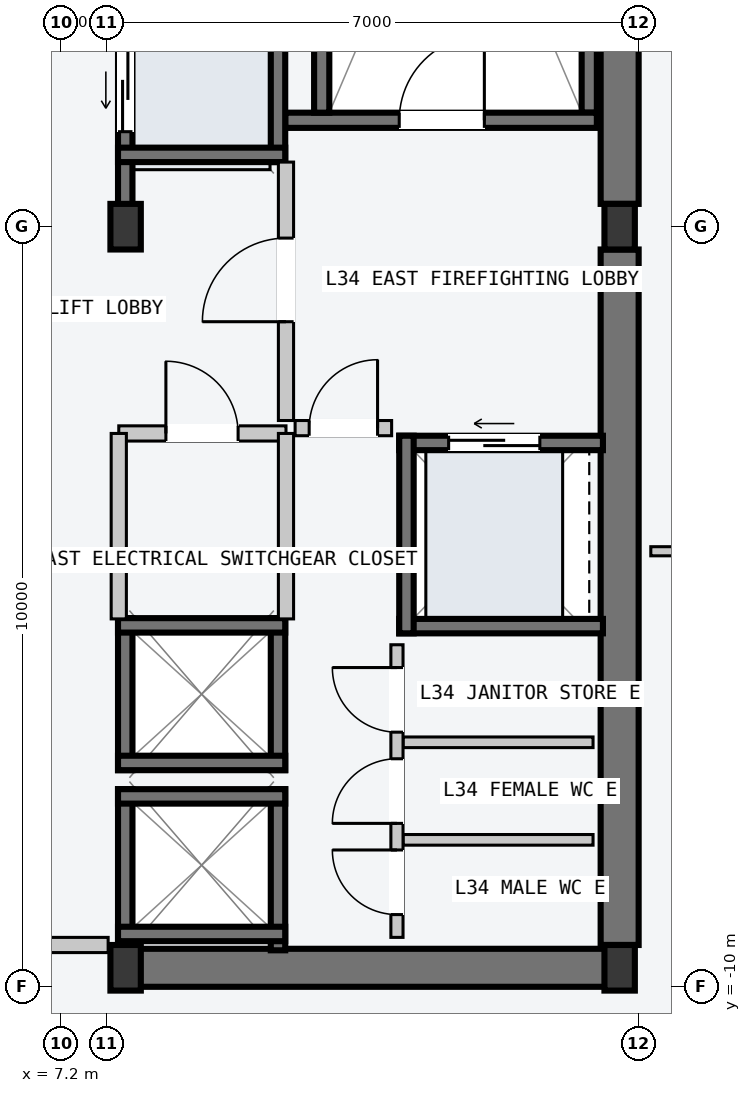
"""IFC4 building model, lengths in metres.
Left out: names, types, materials, properties, quantities, classifications, styles, units other than length and angle.
Written with IfcOpenShell. Run it as: python <this file> out.ifc"""

import sys

from ifc_helpers import new_model, si_unit, direction, frame, frame_2d, origin, origin_2d, place, context, subcontext, project, spatial, rectangle, i_section, extrude, element, fill, save


model = new_model("IFC4")
c1 = context("Model", 3, precision=1e-05, world=origin(), true_north=direction((0.0, 1.0)))
c2 = subcontext(c1, "Body", "Model", "MODEL_VIEW")
j1 = project(units=[si_unit("LENGTHUNIT", "METRE"), si_unit("PLANEANGLEUNIT", "RADIAN")], contexts=[c1])
p1 = place(None, origin())
s1 = spatial("IfcSite", under=j1, at=p1, CompositionType="ELEMENT")
p2 = place(p1, origin())
s2 = spatial("IfcBuilding", under=s1, at=p2, CompositionType="ELEMENT")
p3 = place(p2, frame((0.0, 0.0, 131.4)))
s3 = spatial("IfcBuildingStorey", under=s2, at=p3, CompositionType="ELEMENT", Elevation=131.4)
p4 = place(p3, frame((8.07, -9.75, -0.2), z_axis=(0.0, 0.0, 1.0), x_axis=(1.0, 0.0, 0.0)))
e1 = element("IfcWall", 1, at=p4, inside=s3, PredefinedType="SHEAR", context=c2, shape_type="SweptSolid", body=[
    extrude(rectangle(XDim=6.46, YDim=0.5, at=frame_2d((3.23, 0.0))), origin(), (0.0, 0.0, 1.0), 3.6),
])
for number, where, z_axis, x_axis in (
    (2, (14.55, -9.45, -0.2), (0.0, 0.0, 1.0), (0.0, 1.0, 0.0)),
    (3, (14.55, 0.3, -0.2), (0.0, 0.0, 1.0), (0.0, 1.0, 0.0)),
):
    element("IfcWall", number, at=place(p3, frame(where, z_axis=z_axis, x_axis=x_axis)), inside=s3, PredefinedType="SHEAR", context=c2, shape_type="SweptSolid", body=[
        extrude(rectangle(XDim=9.15, YDim=0.5, at=frame_2d((4.575, 0.0))), origin(), (0.0, 0.0, 1.0), 3.6),
    ])
p5 = place(p3, frame((14.15, 1.5, -0.2), z_axis=(0.0, 0.0, 1.0), x_axis=(0.0, 1.0, 0.0)))
e4 = element("IfcWall", 4, at=p5, inside=s3, PredefinedType="SOLIDWALL", context=c2, shape_type="SweptSolid", body=[
    extrude(rectangle(XDim=7.8, YDim=0.2, at=frame_2d((3.9, 0.0))), origin(), (0.0, 0.0, 1.0), 3.6),
])
p6 = place(p3, frame((10.15, 1.4, -0.2), z_axis=(0.0, 0.0, 1.0), x_axis=(1.0, 0.0, 0.0)))
e5 = element("IfcWall", 5, at=p6, inside=s3, PredefinedType="SOLIDWALL", context=c2, shape_type="SweptSolid", body=[
    extrude(rectangle(XDim=4.1, YDim=0.2, at=frame_2d((2.05, 0.0))), origin(), (0.0, 0.0, 1.0), 3.6),
])
p7 = place(p6, frame((1.5, 0.0, 0.2)))
e6 = element("IfcOpeningElement", 6, at=p7, cuts=e5, PredefinedType="OPENING", context=c2, shape_type="SweptSolid", body=[
    extrude(rectangle(XDim=1.12, YDim=2.18, at=frame_2d((0.56, 1.09))), frame((0.0, 0.11, 0.0), z_axis=(0.0, -1.0, 0.0), x_axis=(1.0, 0.0, 0.0)), (0.0, 0.0, 1.0), 0.22),
])
p8 = place(p3, frame((10.63, 1.5, -0.2), z_axis=(0.0, 0.0, 1.0), x_axis=(0.0, 1.0, 0.0)))
e7 = element("IfcWall", 7, at=p8, inside=s3, PredefinedType="SOLIDWALL", context=c2, shape_type="SweptSolid", body=[
    extrude(rectangle(XDim=7.8, YDim=0.2, at=frame_2d((3.9, 0.0))), origin(), (0.0, 0.0, 1.0), 3.6),
])
for number, where, z_axis, x_axis in (
    (8, (8.05, -9.75, 0.0), (0.0, 0.0, 1.0), (1.0, 0.0, 0.0)),
    (9, (8.05, 0.0, 0.0), (0.0, 0.0, 1.0), (1.0, 0.0, 0.0)),
    (10, (14.55, -9.75, 0.0), (0.0, 0.0, 1.0), (1.0, 0.0, 0.0)),
    (11, (14.55, 0.0, 0.0), (0.0, 0.0, 1.0), (1.0, 0.0, 0.0)),
):
    element("IfcColumn", number, at=place(p3, frame(where, z_axis=z_axis, x_axis=x_axis)), inside=s3, PredefinedType="COLUMN", context=c2, shape_type="SweptSolid", body=[
        extrude(i_section(OverallWidth=0.4, OverallDepth=0.6, WebThickness=0.022, FlangeThickness=0.036, at=origin_2d()), origin(), (0.0, 0.0, 1.0), 3.6),
    ])
p9 = place(p3, frame((8.045, 0.21, -0.2), z_axis=(0.0, 0.0, 1.0), x_axis=(0.0, 1.0, 0.0)))
e12 = element("IfcWall", 12, at=p9, inside=s3, PredefinedType="SOLIDWALL", context=c2, shape_type="SweptSolid", body=[
    extrude(rectangle(XDim=2.54, YDim=0.19, at=frame_2d((1.27, 0.0))), origin(), (0.0, 0.0, 1.0), 3.6),
])
p10 = place(p9, frame((1.04, 0.0, 0.2)))
e13 = element("IfcOpeningElement", 13, at=p10, cuts=e12, PredefinedType="OPENING", context=c2, shape_type="SweptSolid", body=[
    extrude(rectangle(XDim=1.1, YDim=2.2, at=frame_2d((0.55, 1.1))), frame((0.0, 0.105, 0.0), z_axis=(0.0, -1.0, 0.0), x_axis=(1.0, 0.0, 0.0)), (0.0, 0.0, 1.0), 0.21),
])
p11 = place(p3, frame((10.055, 0.85, -0.2), z_axis=(0.0, 0.0, 1.0), x_axis=(0.0, 1.0, 0.0)))
e14 = element("IfcWall", 14, at=p11, inside=s3, PredefinedType="SOLIDWALL", context=c2, shape_type="SweptSolid", body=[
    extrude(rectangle(XDim=1.9, YDim=0.19, at=frame_2d((0.95, 0.0))), origin(), (0.0, 0.0, 1.0), 3.6),
])
p12 = place(p3, frame((7.95, 0.945, -0.2), z_axis=(0.0, 0.0, 1.0), x_axis=(1.0, 0.0, 0.0)))
e15 = element("IfcWall", 15, at=p12, inside=s3, PredefinedType="SOLIDWALL", context=c2, shape_type="SweptSolid", body=[
    extrude(rectangle(XDim=2.2, YDim=0.19, at=frame_2d((1.1, 0.0))), origin(), (0.0, 0.0, 1.0), 3.6),
])
for number, where, z_axis, x_axis in (
    (16, (8.045, -9.52, -0.2), (0.0, 0.0, 1.0), (0.0, 1.0, 0.0)),
    (17, (10.055, -9.52, -0.2), (0.0, 0.0, 1.0), (0.0, 1.0, 0.0)),
):
    element("IfcWall", number, at=place(p3, frame(where, z_axis=z_axis, x_axis=x_axis)), inside=s3, PredefinedType="SOLIDWALL", context=c2, shape_type="SweptSolid", body=[
        extrude(rectangle(XDim=2.12, YDim=0.19, at=frame_2d((1.06, 0.0))), origin(), (0.0, 0.0, 1.0), 3.6),
    ])
for number, where, z_axis, x_axis in (
    (18, (7.95, -7.495, -0.2), (0.0, 0.0, 1.0), (1.0, 0.0, 0.0)),
    (19, (7.95, -9.305, -0.2), (0.0, 0.0, 1.0), (1.0, 0.0, 0.0)),
):
    element("IfcWall", number, at=place(p3, frame(where, z_axis=z_axis, x_axis=x_axis)), inside=s3, PredefinedType="SOLIDWALL", context=c2, shape_type="SweptSolid", body=[
        extrude(rectangle(XDim=2.2, YDim=0.19, at=frame_2d((1.1, 0.0))), origin(), (0.0, 0.0, 1.0), 3.6),
    ])
for number, where, z_axis, x_axis in (
    (20, (8.045, -7.15, -0.2), (0.0, 0.0, 1.0), (0.0, 1.0, 0.0)),
    (21, (10.055, -7.15, -0.2), (0.0, 0.0, 1.0), (0.0, 1.0, 0.0)),
):
    element("IfcWall", number, at=place(p3, frame(where, z_axis=z_axis, x_axis=x_axis)), inside=s3, PredefinedType="SOLIDWALL", context=c2, shape_type="SweptSolid", body=[
        extrude(rectangle(XDim=2.0, YDim=0.19, at=frame_2d((1.0, 0.0))), origin(), (0.0, 0.0, 1.0), 3.6),
    ])
for number, where, z_axis, x_axis in (
    (22, (7.95, -5.245, -0.2), (0.0, 0.0, 1.0), (1.0, 0.0, 0.0)),
    (23, (7.95, -7.055, -0.2), (0.0, 0.0, 1.0), (1.0, 0.0, 0.0)),
):
    element("IfcWall", number, at=place(p3, frame(where, z_axis=z_axis, x_axis=x_axis)), inside=s3, PredefinedType="SOLIDWALL", context=c2, shape_type="SweptSolid", body=[
        extrude(rectangle(XDim=2.2, YDim=0.19, at=frame_2d((1.1, 0.0))), origin(), (0.0, 0.0, 1.0), 3.6),
    ])
p13 = place(p3, frame((11.65, -2.845, -0.2), z_axis=(0.0, 0.0, 1.0), x_axis=(1.0, 0.0, 0.0)))
e24 = element("IfcWall", 24, at=p13, inside=s3, PredefinedType="SOLIDWALL", context=c2, shape_type="SweptSolid", body=[
    extrude(rectangle(XDim=2.68, YDim=0.19, at=frame_2d((1.34, 0.0))), origin(), (0.0, 0.0, 1.0), 3.6),
])
p14 = place(p13, frame((0.65, 0.0, 0.2)))
e25 = element("IfcOpeningElement", 25, at=p14, cuts=e24, PredefinedType="OPENING", context=c2, shape_type="SweptSolid", body=[
    extrude(rectangle(XDim=1.2, YDim=2.2, at=frame_2d((0.6, 1.1))), frame((0.0, 0.105, 0.0), z_axis=(0.0, -1.0, 0.0), x_axis=(1.0, 0.0, 0.0)), (0.0, 0.0, 1.0), 0.21),
])
p15 = place(p3, frame((11.65, -5.255, -0.2), z_axis=(0.0, 0.0, 1.0), x_axis=(1.0, 0.0, 0.0)))
e26 = element("IfcWall", 26, at=p15, inside=s3, PredefinedType="SOLIDWALL", context=c2, shape_type="SweptSolid", body=[
    extrude(rectangle(XDim=2.68, YDim=0.19, at=frame_2d((1.34, 0.0))), origin(), (0.0, 0.0, 1.0), 3.6),
])
p16 = place(p3, frame((11.745, -5.35, -0.2), z_axis=(0.0, 0.0, 1.0), x_axis=(0.0, 1.0, 0.0)))
e27 = element("IfcWall", 27, at=p16, inside=s3, PredefinedType="SOLIDWALL", context=c2, shape_type="SweptSolid", body=[
    extrude(rectangle(XDim=2.6, YDim=0.19, at=frame_2d((1.3, 0.0))), origin(), (0.0, 0.0, 1.0), 3.6),
])
p17 = place(p3, frame((6.02, -9.45, 0.0), z_axis=(0.0, 0.0, 1.0), x_axis=(1.0, 0.0, 0.0)))
e28 = element("IfcWall", 28, at=p17, inside=s3, PredefinedType="PARTITIONING", context=c2, shape_type="SweptSolid", body=[
    extrude(rectangle(XDim=1.8, YDim=0.2, at=frame_2d((0.9, 0.0))), origin(), (0.0, 0.0, 1.0), 3.4),
])
p18 = place(p3, frame((10.16, -2.55, 0.0), z_axis=(0.0, 0.0, 1.0), x_axis=(0.0, 1.0, 0.0)))
e29 = element("IfcWall", 29, at=p18, inside=s3, PredefinedType="PARTITIONING", context=c2, shape_type="SweptSolid", body=[
    extrude(rectangle(XDim=3.4, YDim=0.2, at=frame_2d((1.7, 0.0))), origin(), (0.0, 0.0, 1.0), 3.4),
])
p19 = place(p18, frame((1.3, 0.0, 0.0)))
e30 = element("IfcOpeningElement", 30, at=p19, cuts=e29, PredefinedType="OPENING", context=c2, shape_type="SweptSolid", body=[
    extrude(rectangle(XDim=1.1, YDim=2.15, at=frame_2d((0.55, 1.075))), frame((0.0, 0.11, 0.0), z_axis=(0.0, -1.0, 0.0), x_axis=(1.0, 0.0, 0.0)), (0.0, 0.0, 1.0), 0.22),
])
p20 = place(p3, frame((10.28, -2.65, 0.0), z_axis=(0.0, 0.0, 1.0), x_axis=(1.0, 0.0, 0.0)))
e31 = element("IfcWall", 31, at=p20, inside=s3, PredefinedType="PARTITIONING", context=c2, shape_type="SweptSolid", body=[
    extrude(rectangle(XDim=1.27, YDim=0.2, at=frame_2d((0.635, 0.0))), origin(), (0.0, 0.0, 1.0), 3.4),
])
p21 = place(p20, frame((0.185, 0.0, 0.0)))
e32 = element("IfcOpeningElement", 32, at=p21, cuts=e31, PredefinedType="OPENING", context=c2, shape_type="SweptSolid", body=[
    extrude(rectangle(XDim=0.9, YDim=2.15, at=frame_2d((0.45, 1.075))), frame((0.0, 0.11, 0.0), z_axis=(0.0, -1.0, 0.0), x_axis=(1.0, 0.0, 0.0)), (0.0, 0.0, 1.0), 0.22),
])
p22 = place(p3, frame((7.96, -2.72, 0.0), z_axis=(0.0, 0.0, 1.0), x_axis=(1.0, 0.0, 0.0)))
e33 = element("IfcWall", 33, at=p22, inside=s3, PredefinedType="PARTITIONING", context=c2, shape_type="SweptSolid", body=[
    extrude(rectangle(XDim=2.2, YDim=0.2, at=frame_2d((1.1, 0.0))), origin(), (0.0, 0.0, 1.0), 3.4),
])
p23 = place(p22, frame((0.62, 0.0, 0.0)))
e34 = element("IfcOpeningElement", 34, at=p23, cuts=e33, PredefinedType="OPENING", context=c2, shape_type="SweptSolid", body=[
    extrude(rectangle(XDim=0.95, YDim=2.1, at=frame_2d((0.475, 1.05))), frame((0.0, 0.11, 0.0), z_axis=(0.0, -1.0, 0.0), x_axis=(1.0, 0.0, 0.0)), (0.0, 0.0, 1.0), 0.22),
])
for number, where, z_axis, x_axis in (
    (35, (7.96, -5.16, 0.0), (0.0, 0.0, 1.0), (0.0, 1.0, 0.0)),
    (36, (10.16, -5.16, 0.0), (0.0, 0.0, 1.0), (0.0, 1.0, 0.0)),
):
    element("IfcWall", number, at=place(p3, frame(where, z_axis=z_axis, x_axis=x_axis)), inside=s3, PredefinedType="PARTITIONING", context=c2, shape_type="SweptSolid", body=[
        extrude(rectangle(XDim=2.44, YDim=0.2, at=frame_2d((1.22, 0.0))), origin(), (0.0, 0.0, 1.0), 3.4),
    ])
for number, where, z_axis, x_axis in (
    (37, (11.7, -8.067, 0.0), (0.0, 0.0, 1.0), (1.0, 0.0, 0.0)),
    (38, (11.7, -6.783, 0.0), (0.0, 0.0, 1.0), (1.0, 0.0, 0.0)),
):
    element("IfcWall", number, at=place(p3, frame(where, z_axis=z_axis, x_axis=x_axis)), inside=s3, PredefinedType="PARTITIONING", context=c2, shape_type="SweptSolid", body=[
        extrude(rectangle(XDim=2.5, YDim=0.14, at=frame_2d((1.25, 0.0))), origin(), (0.0, 0.0, 1.0), 3.4),
    ])
p24 = place(p3, frame((11.62, -9.35, 0.0), z_axis=(0.0, 0.0, 1.0), x_axis=(0.0, 1.0, 0.0)))
e39 = element("IfcWall", 39, at=p24, inside=s3, PredefinedType="PARTITIONING", context=c2, shape_type="SweptSolid", body=[
    extrude(rectangle(XDim=3.85, YDim=0.16, at=frame_2d((1.925, 0.0))), origin(), (0.0, 0.0, 1.0), 3.4),
])
p25 = place(p24, frame((0.3, 0.0, 0.0)))
e40 = element("IfcOpeningElement", 40, at=p25, cuts=e39, PredefinedType="OPENING", context=c2, shape_type="SweptSolid", body=[
    extrude(rectangle(XDim=0.85, YDim=2.12, at=frame_2d((0.425, 1.06))), frame((0.0, 0.09, 0.0), z_axis=(0.0, -1.0, 0.0), x_axis=(1.0, 0.0, 0.0)), (0.0, 0.0, 1.0), 0.18),
])
p26 = place(p24, frame((1.5, 0.0, 0.0)))
e41 = element("IfcOpeningElement", 41, at=p26, cuts=e39, PredefinedType="OPENING", context=c2, shape_type="SweptSolid", body=[
    extrude(rectangle(XDim=0.85, YDim=2.12, at=frame_2d((0.425, 1.06))), frame((0.0, 0.09, 0.0), z_axis=(0.0, -1.0, 0.0), x_axis=(1.0, 0.0, 0.0)), (0.0, 0.0, 1.0), 0.18),
])
p27 = place(p24, frame((2.7, 0.0, 0.0)))
e42 = element("IfcOpeningElement", 42, at=p27, cuts=e39, PredefinedType="OPENING", context=c2, shape_type="SweptSolid", body=[
    extrude(rectangle(XDim=0.85, YDim=2.12, at=frame_2d((0.425, 1.06))), frame((0.0, 0.09, 0.0), z_axis=(0.0, -1.0, 0.0), x_axis=(1.0, 0.0, 0.0)), (0.0, 0.0, 1.0), 0.18),
])
p28 = place(p3, frame((14.96, -4.27, 0.0), z_axis=(0.0, 0.0, 1.0), x_axis=(1.0, 0.0, 0.0)))
e43 = element("IfcWall", 43, at=p28, inside=s3, PredefinedType="PARTITIONING", context=c2, shape_type="SweptSolid", body=[
    extrude(rectangle(XDim=6.59, YDim=0.12, at=frame_2d((3.295, 0.0))), origin(), (0.0, 0.0, 1.0), 3.4),
])
p29 = place(p28, frame((0.9, 0.0, 0.0)))
e44 = element("IfcOpeningElement", 44, at=p29, cuts=e43, PredefinedType="OPENING", context=c2, shape_type="SweptSolid", body=[
    extrude(rectangle(XDim=0.96, YDim=2.18, at=frame_2d((0.48, 1.09))), frame((0.0, 0.07, 0.0), z_axis=(0.0, -1.0, 0.0), x_axis=(1.0, 0.0, 0.0)), (0.0, 0.0, 1.0), 0.14),
])
p30 = place(p7, origin())
e45 = element("IfcDoor", 45, at=p30, inside=s3, OperationType="SINGLE_SWING_RIGHT", PredefinedType="DOOR", context=c2, shape_type="SweptSolid", body=[
    extrude(rectangle(XDim=1.12, YDim=2.18, at=frame_2d((0.56, 1.09))), frame((0.0, 0.025, 0.0), z_axis=(0.0, -1.0, 0.0), x_axis=(1.0, 0.0, 0.0)), (0.0, 0.0, 1.0), 0.05),
])
fill(e6, e45)
p31 = place(p10, origin())
e46 = element("IfcDoor", 46, at=p31, inside=s3, OperationType="SLIDING_TO_LEFT", PredefinedType="DOOR", context=c2, shape_type="SweptSolid", body=[
    extrude(rectangle(XDim=1.1, YDim=2.2, at=frame_2d((0.55, 1.1))), frame((0.0, 0.025, 0.0), z_axis=(0.0, -1.0, 0.0), x_axis=(1.0, 0.0, 0.0)), (0.0, 0.0, 1.0), 0.05),
])
fill(e13, e46)
p32 = place(p14, origin())
e47 = element("IfcDoor", 47, at=p32, inside=s3, OperationType="SLIDING_TO_LEFT", PredefinedType="DOOR", context=c2, shape_type="SweptSolid", body=[
    extrude(rectangle(XDim=1.2, YDim=2.2, at=frame_2d((0.6, 1.1))), frame((0.0, 0.025, 0.0), z_axis=(0.0, -1.0, 0.0), x_axis=(1.0, 0.0, 0.0)), (0.0, 0.0, 1.0), 0.05),
])
fill(e25, e47)
p33 = place(p19, origin())
e48 = element("IfcDoor", 48, at=p33, inside=s3, OperationType="SINGLE_SWING_LEFT", PredefinedType="DOOR", context=c2, shape_type="SweptSolid", body=[
    extrude(rectangle(XDim=1.1, YDim=2.15, at=frame_2d((0.55, 1.075))), frame((0.0, 0.025, 0.0), z_axis=(0.0, -1.0, 0.0), x_axis=(1.0, 0.0, 0.0)), (0.0, 0.0, 1.0), 0.05),
])
fill(e30, e48)
p34 = place(p21, origin())
e49 = element("IfcDoor", 49, at=p34, inside=s3, OperationType="SINGLE_SWING_RIGHT", PredefinedType="DOOR", context=c2, shape_type="SweptSolid", body=[
    extrude(rectangle(XDim=0.9, YDim=2.15, at=frame_2d((0.45, 1.075))), frame((0.0, 0.025, 0.0), z_axis=(0.0, -1.0, 0.0), x_axis=(1.0, 0.0, 0.0)), (0.0, 0.0, 1.0), 0.05),
])
fill(e32, e49)
p35 = place(p23, origin())
e50 = element("IfcDoor", 50, at=p35, inside=s3, OperationType="SINGLE_SWING_LEFT", PredefinedType="DOOR", context=c2, shape_type="SweptSolid", body=[
    extrude(rectangle(XDim=0.95, YDim=2.1, at=frame_2d((0.475, 1.05))), frame((0.0, 0.025, 0.0), z_axis=(0.0, -1.0, 0.0), x_axis=(1.0, 0.0, 0.0)), (0.0, 0.0, 1.0), 0.05),
])
fill(e34, e50)
p36 = place(p25, origin())
e51 = element("IfcDoor", 51, at=p36, inside=s3, OperationType="SINGLE_SWING_RIGHT", PredefinedType="DOOR", context=c2, shape_type="SweptSolid", body=[
    extrude(rectangle(XDim=0.85, YDim=2.12, at=frame_2d((0.425, 1.06))), frame((0.0, 0.025, 0.0), z_axis=(0.0, -1.0, 0.0), x_axis=(1.0, 0.0, 0.0)), (0.0, 0.0, 1.0), 0.05),
])
fill(e40, e51)
p37 = place(p26, origin())
e52 = element("IfcDoor", 52, at=p37, inside=s3, OperationType="SINGLE_SWING_LEFT", PredefinedType="DOOR", context=c2, shape_type="SweptSolid", body=[
    extrude(rectangle(XDim=0.85, YDim=2.12, at=frame_2d((0.425, 1.06))), frame((0.0, 0.025, 0.0), z_axis=(0.0, -1.0, 0.0), x_axis=(1.0, 0.0, 0.0)), (0.0, 0.0, 1.0), 0.05),
])
fill(e41, e52)
p38 = place(p27, origin())
e53 = element("IfcDoor", 53, at=p38, inside=s3, OperationType="SINGLE_SWING_RIGHT", PredefinedType="DOOR", context=c2, shape_type="SweptSolid", body=[
    extrude(rectangle(XDim=0.85, YDim=2.12, at=frame_2d((0.425, 1.06))), frame((0.0, 0.025, 0.0), z_axis=(0.0, -1.0, 0.0), x_axis=(1.0, 0.0, 0.0)), (0.0, 0.0, 1.0), 0.05),
])
fill(e42, e53)
save(model, sys.argv[1])
